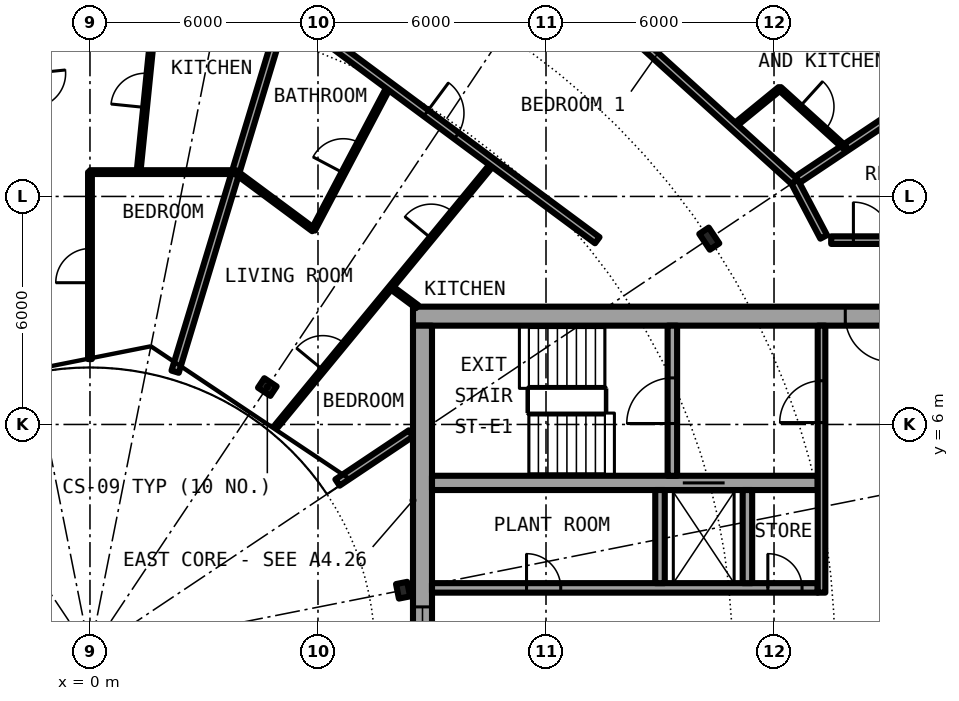
"""IFC4 building model, lengths in metres.
Left out: names, types, materials, properties, quantities, classifications, styles, units other than length and angle.
Written with IfcOpenShell. Run it as: python <this file> out.ifc"""

import sys

from ifc_helpers import new_model, si_unit, direction, frame, frame_2d, origin, origin_2d, place, context, subcontext, project, spatial, rectangle, i_section, extrude, element, fill, save


model = new_model("IFC4")
c1 = context("Model", 3, precision=1e-05, world=origin(), true_north=direction((0.0, 1.0)))
c2 = subcontext(c1, "Body", "Model", "MODEL_VIEW")
j1 = project(units=[si_unit("LENGTHUNIT", "METRE"), si_unit("PLANEANGLEUNIT", "RADIAN")], contexts=[c1])
p1 = place(None, origin())
s1 = spatial("IfcSite", under=j1, at=p1, CompositionType="ELEMENT")
p2 = place(p1, origin())
s2 = spatial("IfcBuilding", under=s1, at=p2, CompositionType="ELEMENT")
p3 = place(p2, frame((0.0, 0.0, 151.3)))
s3 = spatial("IfcBuildingStorey", under=s2, at=p3, CompositionType="ELEMENT", Elevation=151.3)
p4 = place(p3, frame((16.297, 10.889, 0.0), z_axis=(0.0, 0.0, 1.0), x_axis=(0.831469612303, 0.55557023302, 0.0)))
e1 = element("IfcColumn", 1, at=p4, inside=s3, PredefinedType="COLUMN", context=c2, shape_type="SweptSolid", body=[
    extrude(i_section(OverallWidth=0.3, OverallDepth=0.5, WebThickness=0.014, FlangeThickness=0.028, FilletRadius=0.027, at=origin_2d()), origin(), (0.0, 0.0, 1.0), 3.05),
])
for number, where, z_axis, x_axis in (
    (2, (8.239, 1.639, 0.0), (0.0, 0.0, 1.0), (0.981, 0.195, 0.0)),
    (3, (4.667, 6.984, 0.0), (0.0, 0.0, 1.0), (0.556, 0.831, 0.0)),
):
    element("IfcColumn", number, at=place(p3, frame(where, z_axis=z_axis, x_axis=x_axis)), inside=s3, PredefinedType="COLUMN", context=c2, shape_type="SweptSolid", body=[
        extrude(i_section(OverallWidth=0.3, OverallDepth=0.39, WebThickness=0.011, FlangeThickness=0.019, FilletRadius=0.027, at=origin_2d()), origin(), (0.0, 0.0, 1.0), 3.05),
    ])
p5 = place(p3, frame((22.699, 15.167, 0.0), z_axis=(0.0, 0.0, 1.0), x_axis=(-0.634382322723, 0.773019449054, 0.0)))
e4 = element("IfcWall", 4, at=p5, inside=s3, PredefinedType="SOLIDWALL", context=c2, shape_type="SweptSolid", body=[
    extrude(rectangle(XDim=5.352, YDim=0.25, at=frame_2d((2.676, 0.0))), origin(), (0.0, 0.0, 1.0), 2.7),
])
p6 = place(p5, frame((0.441, 0.0, 0.3)))
e5 = element("IfcOpeningElement", 5, at=p6, cuts=e4, PredefinedType="OPENING", context=c2, shape_type="SweptSolid", body=[
    extrude(rectangle(XDim=1.8, YDim=2.1, at=frame_2d((0.9, 1.05))), frame((0.0, 0.135, 0.0), z_axis=(0.0, -1.0, 0.0), x_axis=(1.0, 0.0, 0.0)), (0.0, 0.0, 1.0), 0.27),
])
p7 = place(p5, frame((3.51, 0.0, 0.0)))
e6 = element("IfcOpeningElement", 6, at=p7, cuts=e4, PredefinedType="OPENING", context=c2, shape_type="SweptSolid", body=[
    extrude(rectangle(XDim=1.0, YDim=2.2, at=frame_2d((0.5, 1.1))), frame((0.0, 0.135, 0.0), z_axis=(0.0, -1.0, 0.0), x_axis=(1.0, 0.0, 0.0)), (0.0, 0.0, 1.0), 0.27),
])
p8 = place(p3, frame((22.1, 8.85, 0.0), z_axis=(0.0, 0.0, 1.0), x_axis=(-1.0, 0.0, 0.0)))
e7 = element("IfcWall", 7, at=p8, inside=s3, PredefinedType="SHEAR", context=c2, shape_type="SweptSolid", body=[
    extrude(rectangle(XDim=13.6, YDim=0.5, at=frame_2d((6.8, 0.0))), origin(), (0.0, 0.0, 1.0), 3.05),
])
p9 = place(p8, frame((1.025, 0.0, 0.0)))
e8 = element("IfcOpeningElement", 8, at=p9, cuts=e7, PredefinedType="OPENING", context=c2, shape_type="SweptSolid", body=[
    extrude(rectangle(XDim=1.2, YDim=2.3, at=frame_2d((0.6, 1.15))), frame((0.0, 0.26, 0.0), z_axis=(0.0, -1.0, 0.0), x_axis=(1.0, 0.0, 0.0)), (0.0, 0.0, 1.0), 0.52),
])
p10 = place(p3, frame((8.75, -8.6, 0.0), z_axis=(0.0, 0.0, 1.0), x_axis=(0.0, 1.0, 0.0)))
e9 = element("IfcWall", 9, at=p10, inside=s3, PredefinedType="SHEAR", context=c2, shape_type="SweptSolid", body=[
    extrude(rectangle(XDim=17.2, YDim=0.5, at=frame_2d((8.6, 0.0))), origin(), (0.0, 0.0, 1.0), 3.05),
])
p11 = place(p10, frame((7.4, 0.0, 0.1)))
e10 = element("IfcOpeningElement", 10, at=p11, cuts=e9, PredefinedType="OPENING", context=c2, shape_type="SweptSolid", body=[
    extrude(rectangle(XDim=2.4, YDim=2.2, at=frame_2d((1.2, 1.1))), frame((0.0, 0.26, 0.0), z_axis=(0.0, -1.0, 0.0), x_axis=(1.0, 0.0, 0.0)), (0.0, 0.0, 1.0), 0.52),
])
p12 = place(p3, frame((9.0, 1.7, 0.0), z_axis=(0.0, 0.0, 1.0), x_axis=(1.0, 0.0, 0.0)))
e11 = element("IfcWall", 11, at=p12, inside=s3, PredefinedType="SHEAR", context=c2, shape_type="SweptSolid", body=[
    extrude(rectangle(XDim=10.15, YDim=0.25, at=frame_2d((5.075, 0.0))), origin(), (0.0, 0.0, 1.0), 3.05),
])
p13 = place(p12, frame((2.488, 0.0, 0.0)))
e12 = element("IfcOpeningElement", 12, at=p13, cuts=e11, PredefinedType="OPENING", context=c2, shape_type="SweptSolid", body=[
    extrude(rectangle(XDim=0.9, YDim=2.3, at=frame_2d((0.45, 1.15))), frame((0.0, 0.135, 0.0), z_axis=(0.0, -1.0, 0.0), x_axis=(1.0, 0.0, 0.0)), (0.0, 0.0, 1.0), 0.27),
])
p14 = place(p12, frame((8.837, 0.0, 0.0)))
e13 = element("IfcOpeningElement", 13, at=p14, cuts=e11, PredefinedType="OPENING", context=c2, shape_type="SweptSolid", body=[
    extrude(rectangle(XDim=0.9, YDim=2.3, at=frame_2d((0.45, 1.15))), frame((0.0, 0.135, 0.0), z_axis=(0.0, -1.0, 0.0), x_axis=(1.0, 0.0, 0.0)), (0.0, 0.0, 1.0), 0.27),
])
p15 = place(p3, frame((9.0, 4.462, 0.0), z_axis=(0.0, 0.0, 1.0), x_axis=(1.0, 0.0, 0.0)))
e14 = element("IfcWall", 14, at=p15, inside=s3, PredefinedType="SHEAR", context=c2, shape_type="SweptSolid", body=[
    extrude(rectangle(XDim=10.15, YDim=0.375, at=frame_2d((5.075, 0.0))), origin(), (0.0, 0.0, 1.0), 3.05),
])
p16 = place(p15, frame((6.6, 0.0, 0.0)))
e15 = element("IfcOpeningElement", 15, at=p16, cuts=e14, PredefinedType="OPENING", context=c2, shape_type="SweptSolid", body=[
    extrude(rectangle(XDim=1.1, YDim=2.3, at=frame_2d((0.55, 1.15))), frame((0.0, 0.198, 0.0), z_axis=(0.0, -1.0, 0.0), x_axis=(1.0, 0.0, 0.0)), (0.0, 0.0, 1.0), 0.395),
])
p17 = place(p3, frame((15.325, 4.65, 0.0), z_axis=(0.0, 0.0, 1.0), x_axis=(0.0, 1.0, 0.0)))
e16 = element("IfcWall", 16, at=p17, inside=s3, PredefinedType="SHEAR", context=c2, shape_type="SweptSolid", body=[
    extrude(rectangle(XDim=3.95, YDim=0.25, at=frame_2d((1.975, 0.0))), origin(), (0.0, 0.0, 1.0), 3.05),
])
p18 = place(p17, frame((1.375, 0.0, 0.0)))
e17 = element("IfcOpeningElement", 17, at=p18, cuts=e16, PredefinedType="OPENING", context=c2, shape_type="SweptSolid", body=[
    extrude(rectangle(XDim=1.2, YDim=2.3, at=frame_2d((0.6, 1.15))), frame((0.0, 0.135, 0.0), z_axis=(0.0, -1.0, 0.0), x_axis=(1.0, 0.0, 0.0)), (0.0, 0.0, 1.0), 0.27),
])
for number, where, z_axis, x_axis in (
    (18, (15.0, 1.825, 0.0), (0.0, 0.0, 1.0), (0.0, 1.0, 0.0)),
    (19, (17.3, 1.825, 0.0), (0.0, 0.0, 1.0), (0.0, 1.0, 0.0)),
):
    element("IfcWall", number, at=place(p3, frame(where, z_axis=z_axis, x_axis=x_axis)), inside=s3, PredefinedType="SOLIDWALL", context=c2, shape_type="SweptSolid", body=[
        extrude(rectangle(XDim=2.45, YDim=0.25, at=frame_2d((1.225, 0.0))), origin(), (0.0, 0.0, 1.0), 2.7),
    ])
p19 = place(p3, frame((19.25, 1.575, 0.0), z_axis=(0.0, 0.0, 1.0), x_axis=(0.0, 1.0, 0.0)))
e20 = element("IfcWall", 20, at=p19, inside=s3, PredefinedType="SOLIDWALL", context=c2, shape_type="SweptSolid", body=[
    extrude(rectangle(XDim=7.025, YDim=0.2, at=frame_2d((3.513, 0.0))), origin(), (0.0, 0.0, 1.0), 2.7),
])
p20 = place(p19, frame((4.475, 0.0, 0.0)))
e21 = element("IfcOpeningElement", 21, at=p20, cuts=e20, PredefinedType="OPENING", context=c2, shape_type="SweptSolid", body=[
    extrude(rectangle(XDim=1.1, YDim=2.3, at=frame_2d((0.55, 1.15))), frame((0.0, 0.11, 0.0), z_axis=(0.0, -1.0, 0.0), x_axis=(1.0, 0.0, 0.0)), (0.0, 0.0, 1.0), 0.22),
])
p21 = place(p3, frame((0.0, 7.72, 0.0), z_axis=(0.0, 0.0, 1.0), x_axis=(0.0, 1.0, 0.0)))
e22 = element("IfcWall", 22, at=p21, inside=s3, PredefinedType="PARTITIONING", context=c2, shape_type="SweptSolid", body=[
    extrude(rectangle(XDim=4.92, YDim=0.1, at=frame_2d((2.46, 0.0))), origin(), (0.0, 0.0, 1.0), 2.7),
])
p22 = place(p21, frame((2.01, 0.0, 0.0)))
e23 = element("IfcOpeningElement", 23, at=p22, cuts=e22, PredefinedType="OPENING", context=c2, shape_type="SweptSolid", body=[
    extrude(rectangle(XDim=0.9, YDim=2.3, at=frame_2d((0.45, 1.15))), frame((0.0, 0.06, 0.0), z_axis=(0.0, -1.0, 0.0), x_axis=(1.0, 0.0, 0.0)), (0.0, 0.0, 1.0), 0.12),
])
p23 = place(p3, frame((1.278, 12.64, 0.0), z_axis=(0.0, 0.0, 1.0), x_axis=(0.100650711003, 0.994921823248, 0.0)))
e24 = element("IfcWall", 24, at=p23, inside=s3, PredefinedType="PARTITIONING", context=c2, shape_type="SweptSolid", body=[
    extrude(rectangle(XDim=4.32, YDim=0.1, at=frame_2d((2.16, 0.0))), origin(), (0.0, 0.0, 1.0), 2.7),
])
p24 = place(p23, frame((1.71, 0.0, 0.0)))
e25 = element("IfcOpeningElement", 25, at=p24, cuts=e24, PredefinedType="OPENING", context=c2, shape_type="SweptSolid", body=[
    extrude(rectangle(XDim=0.9, YDim=2.3, at=frame_2d((0.45, 1.15))), frame((0.0, 0.06, 0.0), z_axis=(0.0, -1.0, 0.0), x_axis=(1.0, 0.0, 0.0)), (0.0, 0.0, 1.0), 0.12),
])
p25 = place(p3, frame((2.241, 7.388, 0.0), z_axis=(0.0, 0.0, 1.0), x_axis=(0.290284403441, 0.956940418793, 0.0)))
e26 = element("IfcWall", 26, at=p25, inside=s3, PredefinedType="PARTITIONING", context=c2, shape_type="SweptSolid", body=[
    extrude(rectangle(XDim=9.98, YDim=0.2, at=frame_2d((4.99, 0.0))), origin(), (0.0, 0.0, 1.0), 2.7),
])
p26 = place(p3, frame((4.909, 5.958, 0.0), z_axis=(0.0, 0.0, 1.0), x_axis=(0.635879010442, 0.771788756124, 0.0)))
e27 = element("IfcWall", 27, at=p26, inside=s3, PredefinedType="PARTITIONING", context=c2, shape_type="SweptSolid", body=[
    extrude(rectangle(XDim=8.967, YDim=0.1, at=frame_2d((4.484, 0.0))), origin(), (0.0, 0.0, 1.0), 2.7),
])
p27 = place(p26, frame((6.4, 0.0, 0.0)))
e28 = element("IfcOpeningElement", 28, at=p27, cuts=e27, PredefinedType="OPENING", context=c2, shape_type="SweptSolid", body=[
    extrude(rectangle(XDim=0.9, YDim=2.3, at=frame_2d((0.45, 1.15))), frame((0.0, 0.06, 0.0), z_axis=(0.0, -1.0, 0.0), x_axis=(1.0, 0.0, 0.0)), (0.0, 0.0, 1.0), 0.12),
])
p28 = place(p26, frame((1.917, 0.0, 0.0)))
e29 = element("IfcOpeningElement", 29, at=p28, cuts=e27, PredefinedType="OPENING", context=c2, shape_type="SweptSolid", body=[
    extrude(rectangle(XDim=0.9, YDim=2.3, at=frame_2d((0.45, 1.15))), frame((0.0, 0.06, 0.0), z_axis=(0.0, -1.0, 0.0), x_axis=(1.0, 0.0, 0.0)), (0.0, 0.0, 1.0), 0.12),
])
p29 = place(p3, frame((5.877, 11.125, 0.0), z_axis=(0.0, 0.0, 1.0), x_axis=(0.467030118529, 0.884241408432, 0.0)))
e30 = element("IfcWall", 30, at=p29, inside=s3, PredefinedType="PARTITIONING", context=c2, shape_type="SweptSolid", body=[
    extrude(rectangle(XDim=4.278, YDim=0.1, at=frame_2d((2.139, 0.0))), origin(), (0.0, 0.0, 1.0), 2.7),
])
p30 = place(p29, frame((1.689, 0.0, 0.0)))
e31 = element("IfcOpeningElement", 31, at=p30, cuts=e30, PredefinedType="OPENING", context=c2, shape_type="SweptSolid", body=[
    extrude(rectangle(XDim=0.9, YDim=2.3, at=frame_2d((0.45, 1.15))), frame((0.0, 0.06, 0.0), z_axis=(0.0, -1.0, 0.0), x_axis=(1.0, 0.0, 0.0)), (0.0, 0.0, 1.0), 0.12),
])
p31 = place(p3, frame((16.936, 13.845, 0.0), z_axis=(0.0, 0.0, 1.0), x_axis=(0.774283039722, 0.632839453889, 0.0)))
e32 = element("IfcWall", 32, at=p31, inside=s3, PredefinedType="PARTITIONING", context=c2, shape_type="SweptSolid", body=[
    extrude(rectangle(XDim=1.569, YDim=0.1, at=frame_2d((0.785, 0.0))), origin(), (0.0, 0.0, 1.0), 2.7),
])
p32 = place(p3, frame((18.542, 12.389, 0.0), z_axis=(0.0, 0.0, 1.0), x_axis=(0.831387096605, 0.55569370664, 0.0)))
e33 = element("IfcWall", 33, at=p32, inside=s3, PredefinedType="PARTITIONING", context=c2, shape_type="SweptSolid", body=[
    extrude(rectangle(XDim=4.875, YDim=0.2, at=frame_2d((2.438, 0.0))), origin(), (0.0, 0.0, 1.0), 2.7),
])
p33 = place(p3, frame((6.513, 4.472, 0.0), z_axis=(0.0, 0.0, 1.0), x_axis=(0.83133816625, 0.555766905579, 0.0)))
e34 = element("IfcWall", 34, at=p33, inside=s3, PredefinedType="PARTITIONING", context=c2, shape_type="SweptSolid", body=[
    extrude(rectangle(XDim=2.323, YDim=0.2, at=frame_2d((1.162, 0.0))), origin(), (0.0, 0.0, 1.0), 2.7),
])
p34 = place(p3, frame((19.504, 10.85, 0.0), z_axis=(0.0, 0.0, 1.0), x_axis=(1.0, 0.0, 0.0)))
e35 = element("IfcWall", 35, at=p34, inside=s3, PredefinedType="PARTITIONING", context=c2, shape_type="SweptSolid", body=[
    extrude(rectangle(XDim=2.171, YDim=0.2, at=frame_2d((1.085, 0.0))), origin(), (0.0, 0.0, 1.0), 2.7),
])
p35 = place(p34, frame((0.585, 0.0, 0.0)))
e36 = element("IfcOpeningElement", 36, at=p35, cuts=e35, PredefinedType="OPENING", context=c2, shape_type="SweptSolid", body=[
    extrude(rectangle(XDim=1.0, YDim=2.3, at=frame_2d((0.5, 1.15))), frame((0.0, 0.11, 0.0), z_axis=(0.0, -1.0, 0.0), x_axis=(1.0, 0.0, 0.0)), (0.0, 0.0, 1.0), 0.22),
])
p36 = place(p3, frame((3.834, 12.64, 0.0), z_axis=(0.0, 0.0, 1.0), x_axis=(0.803259509791, -0.595629213463, 0.0)))
e37 = element("IfcWall", 37, at=p36, inside=s3, PredefinedType="PARTITIONING", context=c2, shape_type="SweptSolid", body=[
    extrude(rectangle(XDim=2.543, YDim=0.1, at=frame_2d((1.272, 0.0))), origin(), (0.0, 0.0, 1.0), 2.7),
])
p37 = place(p3, frame((7.918, 9.611, 0.0), z_axis=(0.0, 0.0, 1.0), x_axis=(0.803199066515, -0.595710718007, 0.0)))
e38 = element("IfcWall", 38, at=p37, inside=s3, PredefinedType="PARTITIONING", context=c2, shape_type="SweptSolid", body=[
    extrude(rectangle(XDim=0.858, YDim=0.1, at=frame_2d((0.429, 0.0))), origin(), (0.0, 0.0, 1.0), 2.7),
])
p38 = place(p3, frame((0.0, 12.64, 0.0), z_axis=(0.0, 0.0, 1.0), x_axis=(1.0, 0.0, 0.0)))
e39 = element("IfcWall", 39, at=p38, inside=s3, PredefinedType="PARTITIONING", context=c2, shape_type="SweptSolid", body=[
    extrude(rectangle(XDim=3.834, YDim=0.1, at=frame_2d((1.917, 0.0))), origin(), (0.0, 0.0, 1.0), 2.7),
])
p39 = place(p3, frame((5.137, 16.938, 0.0), z_axis=(0.0, 0.0, 1.0), x_axis=(0.803229232922, -0.595670042371, 0.0)))
e40 = element("IfcWall", 40, at=p39, inside=s3, PredefinedType="PARTITIONING", context=c2, shape_type="SweptSolid", body=[
    extrude(rectangle(XDim=10.224, YDim=0.2, at=frame_2d((5.112, 0.0))), origin(), (0.0, 0.0, 1.0), 2.7),
])
p40 = place(p39, frame((4.612, 0.0, 0.0)))
e41 = element("IfcOpeningElement", 41, at=p40, cuts=e40, PredefinedType="OPENING", context=c2, shape_type="SweptSolid", body=[
    extrude(rectangle(XDim=1.0, YDim=2.3, at=frame_2d((0.5, 1.15))), frame((0.0, 0.11, 0.0), z_axis=(0.0, -1.0, 0.0), x_axis=(1.0, 0.0, 0.0)), (0.0, 0.0, 1.0), 0.22),
])
p41 = place(p3, frame((10.512, 19.667, 0.0), z_axis=(0.0, 0.0, 1.0), x_axis=(0.740947367223, -0.671563101283, 0.0)))
e42 = element("IfcWall", 42, at=p41, inside=s3, PredefinedType="PARTITIONING", context=c2, shape_type="SweptSolid", body=[
    extrude(rectangle(XDim=10.837, YDim=0.2, at=frame_2d((5.419, 0.0))), origin(), (0.0, 0.0, 1.0), 2.7),
])
p42 = place(p41, frame((3.835, 0.0, 0.0)))
e43 = element("IfcOpeningElement", 43, at=p42, cuts=e42, PredefinedType="OPENING", context=c2, shape_type="SweptSolid", body=[
    extrude(rectangle(XDim=1.0, YDim=2.3, at=frame_2d((0.5, 1.15))), frame((0.0, 0.11, 0.0), z_axis=(0.0, -1.0, 0.0), x_axis=(1.0, 0.0, 0.0)), (0.0, 0.0, 1.0), 0.22),
])
p43 = place(p3, frame((18.542, 12.389, 0.0), z_axis=(0.0, 0.0, 1.0), x_axis=(0.465605550524, -0.884992356646, 0.0)))
e44 = element("IfcWall", 44, at=p43, inside=s3, PredefinedType="PARTITIONING", context=c2, shape_type="SweptSolid", body=[
    extrude(rectangle(XDim=1.643, YDim=0.2, at=frame_2d((0.821, 0.0))), origin(), (0.0, 0.0, 1.0), 2.7),
])
p44 = place(p3, frame((18.149, 14.84, 0.0), z_axis=(0.0, 0.0, 1.0), x_axis=(0.741127434804, -0.671364376014, 0.0)))
e45 = element("IfcWall", 45, at=p44, inside=s3, PredefinedType="PARTITIONING", context=c2, shape_type="SweptSolid", body=[
    extrude(rectangle(XDim=2.324, YDim=0.1, at=frame_2d((1.162, 0.0))), origin(), (0.0, 0.0, 1.0), 2.7),
])
p45 = place(p44, frame((0.714, 0.0, 0.0)))
e46 = element("IfcOpeningElement", 46, at=p45, cuts=e45, PredefinedType="OPENING", context=c2, shape_type="SweptSolid", body=[
    extrude(rectangle(XDim=0.9, YDim=2.3, at=frame_2d((0.45, 1.15))), frame((0.0, 0.06, 0.0), z_axis=(0.0, -1.0, 0.0), x_axis=(1.0, 0.0, 0.0)), (0.0, 0.0, 1.0), 0.12),
])
p46 = place(p16, origin())
e47 = element("IfcDoor", 47, at=p46, inside=s3, OperationType="DOUBLE_DOOR_SLIDING", PredefinedType="DOOR", context=c2, shape_type="SweptSolid", body=[
    extrude(rectangle(XDim=1.1, YDim=2.3, at=frame_2d((0.55, 1.15))), frame((0.0, 0.025, 0.0), z_axis=(0.0, -1.0, 0.0), x_axis=(1.0, 0.0, 0.0)), (0.0, 0.0, 1.0), 0.05),
])
fill(e15, e47)
p47 = place(p13, origin())
e48 = element("IfcDoor", 48, at=p47, inside=s3, OperationType="SINGLE_SWING_RIGHT", PredefinedType="DOOR", context=c2, shape_type="SweptSolid", body=[
    extrude(rectangle(XDim=0.9, YDim=2.3, at=frame_2d((0.45, 1.15))), frame((0.0, 0.025, 0.0), z_axis=(0.0, -1.0, 0.0), x_axis=(1.0, 0.0, 0.0)), (0.0, 0.0, 1.0), 0.05),
])
fill(e12, e48)
p48 = place(p14, origin())
e49 = element("IfcDoor", 49, at=p48, inside=s3, OperationType="SINGLE_SWING_LEFT", PredefinedType="DOOR", context=c2, shape_type="SweptSolid", body=[
    extrude(rectangle(XDim=0.9, YDim=2.3, at=frame_2d((0.45, 1.15))), frame((0.0, 0.025, 0.0), z_axis=(0.0, -1.0, 0.0), x_axis=(1.0, 0.0, 0.0)), (0.0, 0.0, 1.0), 0.05),
])
fill(e13, e49)
p49 = place(p18, origin())
e50 = element("IfcDoor", 50, at=p49, inside=s3, OperationType="SINGLE_SWING_LEFT", PredefinedType="DOOR", context=c2, shape_type="SweptSolid", body=[
    extrude(rectangle(XDim=1.2, YDim=2.3, at=frame_2d((0.6, 1.15))), frame((0.0, 0.025, 0.0), z_axis=(0.0, -1.0, 0.0), x_axis=(1.0, 0.0, 0.0)), (0.0, 0.0, 1.0), 0.05),
])
fill(e17, e50)
p50 = place(p20, origin())
e51 = element("IfcDoor", 51, at=p50, inside=s3, OperationType="SINGLE_SWING_LEFT", PredefinedType="DOOR", context=c2, shape_type="SweptSolid", body=[
    extrude(rectangle(XDim=1.1, YDim=2.3, at=frame_2d((0.55, 1.15))), frame((0.0, 0.025, 0.0), z_axis=(0.0, -1.0, 0.0), x_axis=(1.0, 0.0, 0.0)), (0.0, 0.0, 1.0), 0.05),
])
fill(e21, e51)
p51 = place(p9, origin())
e52 = element("IfcDoor", 52, at=p51, inside=s3, OperationType="SINGLE_SWING_RIGHT", PredefinedType="DOOR", context=c2, shape_type="SweptSolid", body=[
    extrude(rectangle(XDim=1.2, YDim=2.3, at=frame_2d((0.6, 1.15))), frame((0.0, 0.025, 0.0), z_axis=(0.0, -1.0, 0.0), x_axis=(1.0, 0.0, 0.0)), (0.0, 0.0, 1.0), 0.05),
])
fill(e8, e52)
p52 = place(p11, origin())
e53 = element("IfcWindow", 53, at=p52, inside=s3, PartitioningType="SINGLE_PANEL", PredefinedType="WINDOW", context=c2, shape_type="SweptSolid", body=[
    extrude(rectangle(XDim=2.4, YDim=2.2, at=frame_2d((1.2, 1.1))), frame((0.0, 0.03, 0.0), z_axis=(0.0, -1.0, 0.0), x_axis=(1.0, 0.0, 0.0)), (0.0, 0.0, 1.0), 0.06),
])
fill(e10, e53)
p53 = place(p45, origin())
e54 = element("IfcDoor", 54, at=p53, inside=s3, OperationType="SINGLE_SWING_RIGHT", PredefinedType="DOOR", context=c2, shape_type="SweptSolid", body=[
    extrude(rectangle(XDim=0.9, YDim=2.3, at=frame_2d((0.45, 1.15))), frame((0.0, 0.025, 0.0), z_axis=(0.0, -1.0, 0.0), x_axis=(1.0, 0.0, 0.0)), (0.0, 0.0, 1.0), 0.05),
])
fill(e46, e54)
p54 = place(p40, origin())
e55 = element("IfcDoor", 55, at=p54, inside=s3, OperationType="SINGLE_SWING_RIGHT", PredefinedType="DOOR", context=c2, shape_type="SweptSolid", body=[
    extrude(rectangle(XDim=1.0, YDim=2.3, at=frame_2d((0.5, 1.15))), frame((0.0, 0.025, 0.0), z_axis=(0.0, -1.0, 0.0), x_axis=(1.0, 0.0, 0.0)), (0.0, 0.0, 1.0), 0.05),
])
fill(e41, e55)
p55 = place(p30, origin())
e56 = element("IfcDoor", 56, at=p55, inside=s3, OperationType="SINGLE_SWING_RIGHT", PredefinedType="DOOR", context=c2, shape_type="SweptSolid", body=[
    extrude(rectangle(XDim=0.9, YDim=2.3, at=frame_2d((0.45, 1.15))), frame((0.0, 0.025, 0.0), z_axis=(0.0, -1.0, 0.0), x_axis=(1.0, 0.0, 0.0)), (0.0, 0.0, 1.0), 0.05),
])
fill(e31, e56)
p56 = place(p27, origin())
e57 = element("IfcDoor", 57, at=p56, inside=s3, OperationType="SINGLE_SWING_RIGHT", PredefinedType="DOOR", context=c2, shape_type="SweptSolid", body=[
    extrude(rectangle(XDim=0.9, YDim=2.3, at=frame_2d((0.45, 1.15))), frame((0.0, 0.025, 0.0), z_axis=(0.0, -1.0, 0.0), x_axis=(1.0, 0.0, 0.0)), (0.0, 0.0, 1.0), 0.05),
])
fill(e28, e57)
p57 = place(p28, origin())
e58 = element("IfcDoor", 58, at=p57, inside=s3, OperationType="SINGLE_SWING_LEFT", PredefinedType="DOOR", context=c2, shape_type="SweptSolid", body=[
    extrude(rectangle(XDim=0.9, YDim=2.3, at=frame_2d((0.45, 1.15))), frame((0.0, 0.025, 0.0), z_axis=(0.0, -1.0, 0.0), x_axis=(1.0, 0.0, 0.0)), (0.0, 0.0, 1.0), 0.05),
])
fill(e29, e58)
p58 = place(p24, origin())
e59 = element("IfcDoor", 59, at=p58, inside=s3, OperationType="SINGLE_SWING_RIGHT", PredefinedType="DOOR", context=c2, shape_type="SweptSolid", body=[
    extrude(rectangle(XDim=0.9, YDim=2.3, at=frame_2d((0.45, 1.15))), frame((0.0, 0.025, 0.0), z_axis=(0.0, -1.0, 0.0), x_axis=(1.0, 0.0, 0.0)), (0.0, 0.0, 1.0), 0.05),
])
fill(e25, e59)
p59 = place(p22, origin())
e60 = element("IfcDoor", 60, at=p59, inside=s3, OperationType="SINGLE_SWING_RIGHT", PredefinedType="DOOR", context=c2, shape_type="SweptSolid", body=[
    extrude(rectangle(XDim=0.9, YDim=2.3, at=frame_2d((0.45, 1.15))), frame((0.0, 0.025, 0.0), z_axis=(0.0, -1.0, 0.0), x_axis=(1.0, 0.0, 0.0)), (0.0, 0.0, 1.0), 0.05),
])
fill(e23, e60)
p60 = place(p35, origin())
e61 = element("IfcDoor", 61, at=p60, inside=s3, OperationType="SINGLE_SWING_LEFT", PredefinedType="DOOR", context=c2, shape_type="SweptSolid", body=[
    extrude(rectangle(XDim=1.0, YDim=2.3, at=frame_2d((0.5, 1.15))), frame((0.0, 0.025, 0.0), z_axis=(0.0, -1.0, 0.0), x_axis=(1.0, 0.0, 0.0)), (0.0, 0.0, 1.0), 0.05),
])
fill(e36, e61)
save(model, sys.argv[1])
